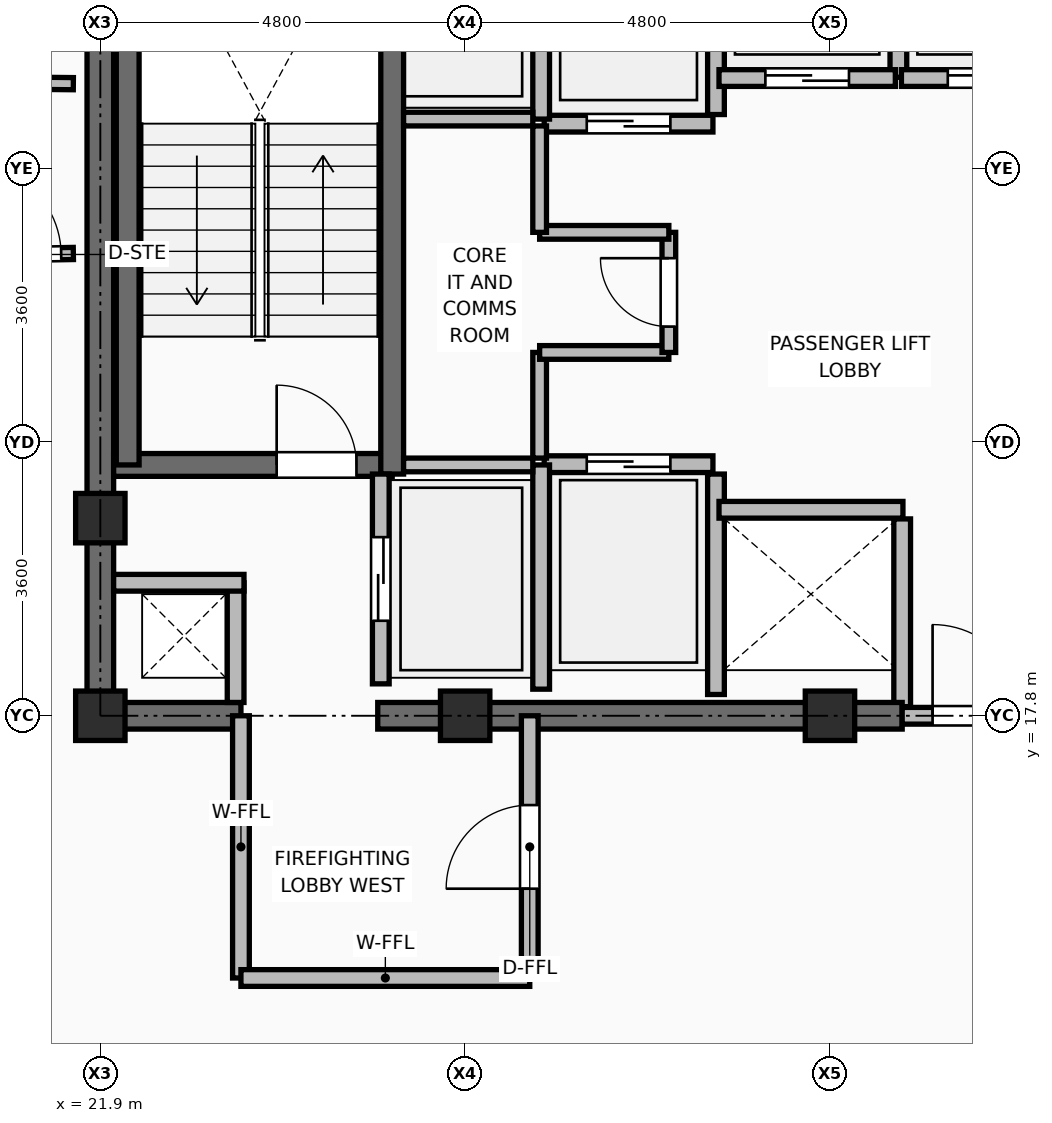
"""IFC4 building model, lengths in metres.
Left out: names, types, materials, properties, quantities, classifications, styles, units other than length and angle.
Written with IfcOpenShell. Run it as: python <this file> out.ifc"""

import sys

from ifc_helpers import new_model, si_unit, direction, frame, frame_2d, origin, origin_2d, place, context, subcontext, project, spatial, rectangle, extrude, element, fill, save


model = new_model("IFC4")
c1 = context("Model", 3, precision=1e-05, world=origin(), true_north=direction((0.0, 1.0)))
c2 = subcontext(c1, "Body", "Model", "MODEL_VIEW")
j1 = project(units=[si_unit("LENGTHUNIT", "METRE"), si_unit("PLANEANGLEUNIT", "RADIAN")], contexts=[c1])
p1 = place(None, origin())
s1 = spatial("IfcSite", under=j1, at=p1, CompositionType="ELEMENT")
p2 = place(p1, origin())
s2 = spatial("IfcBuilding", under=s1, at=p2, CompositionType="ELEMENT")
p3 = place(p2, frame((0.0, 0.0, 271.35)))
s3 = spatial("IfcBuildingStorey", under=s2, at=p3, CompositionType="ELEMENT", Elevation=271.35)
for number, where, z_axis, x_axis in (
    (1, (21.9, 17.8, 0.0), (0.0, 0.0, 1.0), (1.0, 0.0, 0.0)),
    (2, (26.7, 17.8, 0.0), (0.0, 0.0, 1.0), (1.0, 0.0, 0.0)),
    (3, (31.5, 17.8, 0.0), (0.0, 0.0, 1.0), (1.0, 0.0, 0.0)),
    (4, (21.9, 20.4, 0.0), (0.0, 0.0, 1.0), (1.0, 0.0, 0.0)),
):
    element("IfcColumn", number, at=place(p3, frame(where, z_axis=z_axis, x_axis=x_axis)), inside=s3, PredefinedType="COLUMN", context=c2, shape_type="SweptSolid", body=[
        extrude(rectangle(XDim=0.65, YDim=0.65, at=origin_2d()), origin(), (0.0, 0.0, 1.0), 3.75),
    ])
p4 = place(p3, frame((30.0, 18.08, 0.0), z_axis=(0.0, 0.0, 1.0), x_axis=(0.0, 1.0, 0.0)))
e5 = element("IfcWall", 5, at=p4, inside=s3, PredefinedType="PARTITIONING", context=c2, shape_type="SweptSolid", body=[
    extrude(rectangle(XDim=2.9, YDim=0.22, at=frame_2d((1.45, 0.0))), origin(), (0.0, 0.0, 1.0), 3.545),
])
p5 = place(p3, frame((32.45, 17.92, 0.0), z_axis=(0.0, 0.0, 1.0), x_axis=(0.0, 1.0, 0.0)))
e6 = element("IfcWall", 6, at=p5, inside=s3, PredefinedType="PARTITIONING", context=c2, shape_type="SweptSolid", body=[
    extrude(rectangle(XDim=2.47, YDim=0.22, at=frame_2d((1.235, 0.0))), origin(), (0.0, 0.0, 1.0), 3.545),
])
p6 = place(p3, frame((30.0, 25.71, 0.0), z_axis=(0.0, 0.0, 1.0), x_axis=(0.0, 1.0, 0.0)))
e7 = element("IfcWall", 7, at=p6, inside=s3, PredefinedType="PARTITIONING", context=c2, shape_type="SweptSolid", body=[
    extrude(rectangle(XDim=2.73, YDim=0.22, at=frame_2d((1.365, 0.0))), origin(), (0.0, 0.0, 1.0), 3.545),
])
p7 = place(p3, frame((32.4, 26.2, 0.0), z_axis=(0.0, 0.0, 1.0), x_axis=(0.0, 1.0, 0.0)))
e8 = element("IfcWall", 8, at=p7, inside=s3, PredefinedType="PARTITIONING", context=c2, shape_type="SweptSolid", body=[
    extrude(rectangle(XDim=2.24, YDim=0.22, at=frame_2d((1.12, 0.0))), origin(), (0.0, 0.0, 1.0), 3.545),
])
p8 = place(p3, frame((21.725, 17.8, 0.0), z_axis=(0.0, 0.0, 1.0), x_axis=(1.0, 0.0, 0.0)))
e9 = element("IfcWall", 9, at=p8, inside=s3, PredefinedType="SHEAR", context=c2, shape_type="SweptSolid", body=[
    extrude(rectangle(XDim=2.025, YDim=0.35, at=frame_2d((1.012, 0.0))), origin(), (0.0, 0.0, 1.0), 3.57),
])
p9 = place(p3, frame((25.55, 17.8, 0.0), z_axis=(0.0, 0.0, 1.0), x_axis=(1.0, 0.0, 0.0)))
e10 = element("IfcWall", 10, at=p9, inside=s3, PredefinedType="SHEAR", context=c2, shape_type="SweptSolid", body=[
    extrude(rectangle(XDim=6.9, YDim=0.35, at=frame_2d((3.45, 0.0))), origin(), (0.0, 0.0, 1.0), 3.57),
])
p10 = place(p3, frame((32.45, 17.8, 0.0), z_axis=(0.0, 0.0, 1.0), x_axis=(1.0, 0.0, 0.0)))
e11 = element("IfcWall", 11, at=p10, inside=s3, PredefinedType="PARTITIONING", context=c2, shape_type="SweptSolid", body=[
    extrude(rectangle(XDim=2.5, YDim=0.22, at=frame_2d((1.25, 0.0))), origin(), (0.0, 0.0, 1.0), 3.132),
])
p11 = place(p10, frame((0.4, 0.0, 0.0)))
e12 = element("IfcOpeningElement", 12, at=p11, cuts=e11, PredefinedType="OPENING", context=c2, shape_type="SweptSolid", body=[
    extrude(rectangle(XDim=1.2, YDim=2.1, at=frame_2d((0.6, 1.05))), frame((0.0, 0.12, 0.0), z_axis=(0.0, -1.0, 0.0), x_axis=(1.0, 0.0, 0.0)), (0.0, 0.0, 1.0), 0.24),
])
p12 = place(p3, frame((21.9, 17.975, 0.0), z_axis=(0.0, 0.0, 1.0), x_axis=(0.0, 1.0, 0.0)))
e13 = element("IfcWall", 13, at=p12, inside=s3, PredefinedType="SHEAR", context=c2, shape_type="SweptSolid", body=[
    extrude(rectangle(XDim=14.3, YDim=0.35, at=frame_2d((7.15, 0.0))), origin(), (0.0, 0.0, 1.0), 3.57),
])
p13 = place(p3, frame((22.075, 21.1, 0.0), z_axis=(0.0, 0.0, 1.0), x_axis=(1.0, 0.0, 0.0)))
e14 = element("IfcWall", 14, at=p13, inside=s3, PredefinedType="SHEAR", context=c2, shape_type="SweptSolid", body=[
    extrude(rectangle(XDim=3.665, YDim=0.3, at=frame_2d((1.833, 0.0))), origin(), (0.0, 0.0, 1.0), 3.57),
])
p14 = place(p13, frame((2.145, 0.0, 0.0)))
e15 = element("IfcOpeningElement", 15, at=p14, cuts=e14, PredefinedType="OPENING", context=c2, shape_type="SweptSolid", body=[
    extrude(rectangle(XDim=1.05, YDim=2.1, at=frame_2d((0.525, 1.05))), frame((0.0, 0.16, 0.0), z_axis=(0.0, -1.0, 0.0), x_axis=(1.0, 0.0, 0.0)), (0.0, 0.0, 1.0), 0.32),
])
p15 = place(p3, frame((25.74, 20.98, 0.0), z_axis=(0.0, 0.0, 1.0), x_axis=(0.0, 1.0, 0.0)))
e16 = element("IfcWall", 16, at=p15, inside=s3, PredefinedType="SHEAR", context=c2, shape_type="SweptSolid", body=[
    extrude(rectangle(XDim=7.99, YDim=0.3, at=frame_2d((3.995, 0.0))), origin(), (0.0, 0.0, 1.0), 3.57),
])
p16 = place(p3, frame((22.26, 21.1, 0.0), z_axis=(0.0, 0.0, 1.0), x_axis=(0.0, 1.0, 0.0)))
e17 = element("IfcWall", 17, at=p16, inside=s3, PredefinedType="SHEAR", context=c2, shape_type="SweptSolid", body=[
    extrude(rectangle(XDim=7.75, YDim=0.3, at=frame_2d((3.875, 0.0))), origin(), (0.0, 0.0, 1.0), 3.57),
])
p17 = place(p3, frame((23.68, 17.975, 0.0), z_axis=(0.0, 0.0, 1.0), x_axis=(0.0, 1.0, 0.0)))
e18 = element("IfcWall", 18, at=p17, inside=s3, PredefinedType="PARTITIONING", context=c2, shape_type="SweptSolid", body=[
    extrude(rectangle(XDim=1.575, YDim=0.22, at=frame_2d((0.788, 0.0))), origin(), (0.0, 0.0, 1.0), 3.132),
])
p18 = place(p3, frame((22.075, 19.55, 0.0), z_axis=(0.0, 0.0, 1.0), x_axis=(1.0, 0.0, 0.0)))
e19 = element("IfcWall", 19, at=p18, inside=s3, PredefinedType="PARTITIONING", context=c2, shape_type="SweptSolid", body=[
    extrude(rectangle(XDim=1.715, YDim=0.22, at=frame_2d((0.857, 0.0))), origin(), (0.0, 0.0, 1.0), 2.595),
])
p19 = place(p3, frame((25.59, 18.22, 0.0), z_axis=(0.0, 0.0, 1.0), x_axis=(0.0, 1.0, 0.0)))
e20 = element("IfcWall", 20, at=p19, inside=s3, PredefinedType="PARTITIONING", context=c2, shape_type="SweptSolid", body=[
    extrude(rectangle(XDim=2.76, YDim=0.22, at=frame_2d((1.38, 0.0))), origin(), (0.0, 0.0, 1.0), 3.55),
])
p20 = place(p19, frame((0.83, 0.0, 0.0)))
e21 = element("IfcOpeningElement", 21, at=p20, cuts=e20, PredefinedType="OPENING", context=c2, shape_type="SweptSolid", body=[
    extrude(rectangle(XDim=1.1, YDim=2.2, at=frame_2d((0.55, 1.1))), frame((0.0, 0.12, 0.0), z_axis=(0.0, -1.0, 0.0), x_axis=(1.0, 0.0, 0.0)), (0.0, 0.0, 1.0), 0.24),
])
p21 = place(p3, frame((27.74, 21.11, 0.0), z_axis=(0.0, 0.0, 1.0), x_axis=(1.0, 0.0, 0.0)))
e22 = element("IfcWall", 22, at=p21, inside=s3, PredefinedType="PARTITIONING", context=c2, shape_type="SweptSolid", body=[
    extrude(rectangle(XDim=2.22, YDim=0.22, at=frame_2d((1.11, 0.0))), origin(), (0.0, 0.0, 1.0), 3.55),
])
p22 = place(p21, frame((0.56, 0.0, 0.0)))
e23 = element("IfcOpeningElement", 23, at=p22, cuts=e22, PredefinedType="OPENING", context=c2, shape_type="SweptSolid", body=[
    extrude(rectangle(XDim=1.1, YDim=2.2, at=frame_2d((0.55, 1.1))), frame((0.0, 0.12, 0.0), z_axis=(0.0, -1.0, 0.0), x_axis=(1.0, 0.0, 0.0)), (0.0, 0.0, 1.0), 0.24),
])
p23 = place(p3, frame((27.74, 25.59, 0.0), z_axis=(0.0, 0.0, 1.0), x_axis=(1.0, 0.0, 0.0)))
e24 = element("IfcWall", 24, at=p23, inside=s3, PredefinedType="PARTITIONING", context=c2, shape_type="SweptSolid", body=[
    extrude(rectangle(XDim=2.22, YDim=0.22, at=frame_2d((1.11, 0.0))), origin(), (0.0, 0.0, 1.0), 3.55),
])
p24 = place(p23, frame((0.56, 0.0, 0.0)))
e25 = element("IfcOpeningElement", 25, at=p24, cuts=e24, PredefinedType="OPENING", context=c2, shape_type="SweptSolid", body=[
    extrude(rectangle(XDim=1.1, YDim=2.2, at=frame_2d((0.55, 1.1))), frame((0.0, 0.12, 0.0), z_axis=(0.0, -1.0, 0.0), x_axis=(1.0, 0.0, 0.0)), (0.0, 0.0, 1.0), 0.24),
])
p25 = place(p3, frame((30.04, 20.51, 0.0), z_axis=(0.0, 0.0, 1.0), x_axis=(1.0, 0.0, 0.0)))
e26 = element("IfcWall", 26, at=p25, inside=s3, PredefinedType="PARTITIONING", context=c2, shape_type="SweptSolid", body=[
    extrude(rectangle(XDim=2.42, YDim=0.22, at=frame_2d((1.21, 0.0))), origin(), (0.0, 0.0, 1.0), 3.55),
])
p26 = place(p3, frame((30.04, 26.19, 0.0), z_axis=(0.0, 0.0, 1.0), x_axis=(1.0, 0.0, 0.0)))
e27 = element("IfcWall", 27, at=p26, inside=s3, PredefinedType="PARTITIONING", context=c2, shape_type="SweptSolid", body=[
    extrude(rectangle(XDim=2.32, YDim=0.22, at=frame_2d((1.16, 0.0))), origin(), (0.0, 0.0, 1.0), 3.55),
])
p27 = place(p26, frame((0.61, 0.0, 0.0)))
e28 = element("IfcOpeningElement", 28, at=p27, cuts=e27, PredefinedType="OPENING", context=c2, shape_type="SweptSolid", body=[
    extrude(rectangle(XDim=1.1, YDim=2.2, at=frame_2d((0.55, 1.1))), frame((0.0, 0.12, 0.0), z_axis=(0.0, -1.0, 0.0), x_axis=(1.0, 0.0, 0.0)), (0.0, 0.0, 1.0), 0.24),
])
p28 = place(p3, frame((32.44, 26.19, 0.0), z_axis=(0.0, 0.0, 1.0), x_axis=(1.0, 0.0, 0.0)))
e29 = element("IfcWall", 29, at=p28, inside=s3, PredefinedType="PARTITIONING", context=c2, shape_type="SweptSolid", body=[
    extrude(rectangle(XDim=2.32, YDim=0.22, at=frame_2d((1.16, 0.0))), origin(), (0.0, 0.0, 1.0), 3.55),
])
p29 = place(p28, frame((0.61, 0.0, 0.0)))
e30 = element("IfcOpeningElement", 30, at=p29, cuts=e29, PredefinedType="OPENING", context=c2, shape_type="SweptSolid", body=[
    extrude(rectangle(XDim=1.1, YDim=2.2, at=frame_2d((0.55, 1.1))), frame((0.0, 0.12, 0.0), z_axis=(0.0, -1.0, 0.0), x_axis=(1.0, 0.0, 0.0)), (0.0, 0.0, 1.0), 0.24),
])
p30 = place(p3, frame((27.7, 18.15, 0.0), z_axis=(0.0, 0.0, 1.0), x_axis=(0.0, 1.0, 0.0)))
e31 = element("IfcWall", 31, at=p30, inside=s3, PredefinedType="PARTITIONING", context=c2, shape_type="SweptSolid", body=[
    extrude(rectangle(XDim=2.95, YDim=0.22, at=frame_2d((1.475, 0.0))), origin(), (0.0, 0.0, 1.0), 3.55),
])
p31 = place(p3, frame((27.7, 25.65, 0.0), z_axis=(0.0, 0.0, 1.0), x_axis=(0.0, 1.0, 0.0)))
e32 = element("IfcWall", 32, at=p31, inside=s3, PredefinedType="PARTITIONING", context=c2, shape_type="SweptSolid", body=[
    extrude(rectangle(XDim=3.0, YDim=0.22, at=frame_2d((1.5, 0.0))), origin(), (0.0, 0.0, 1.0), 3.55),
])
for number, where, z_axis, x_axis in (
    (33, (25.89, 21.1, 0.0), (0.0, 0.0, 1.0), (1.0, 0.0, 0.0)),
    (34, (25.89, 25.65, 0.0), (0.0, 0.0, 1.0), (1.0, 0.0, 0.0)),
):
    element("IfcWall", number, at=place(p3, frame(where, z_axis=z_axis, x_axis=x_axis)), inside=s3, PredefinedType="PARTITIONING", context=c2, shape_type="SweptSolid", body=[
        extrude(rectangle(XDim=1.7, YDim=0.18, at=frame_2d((0.85, 0.0))), origin(), (0.0, 0.0, 1.0), 3.55),
    ])
p32 = place(p3, frame((27.68, 21.19, 0.0), z_axis=(0.0, 0.0, 1.0), x_axis=(0.0, 1.0, 0.0)))
e35 = element("IfcWall", 35, at=p32, inside=s3, PredefinedType="PARTITIONING", context=c2, shape_type="SweptSolid", body=[
    extrude(rectangle(XDim=1.39, YDim=0.18, at=frame_2d((0.695, 0.0))), origin(), (0.0, 0.0, 1.0), 3.55),
])
p33 = place(p3, frame((27.68, 22.58, 0.0), z_axis=(0.0, 0.0, 1.0), x_axis=(1.0, 0.0, 0.0)))
e36 = element("IfcWall", 36, at=p33, inside=s3, PredefinedType="PARTITIONING", context=c2, shape_type="SweptSolid", body=[
    extrude(rectangle(XDim=1.7, YDim=0.18, at=frame_2d((0.85, 0.0))), origin(), (0.0, 0.0, 1.0), 3.55),
])
p34 = place(p3, frame((29.38, 22.58, 0.0), z_axis=(0.0, 0.0, 1.0), x_axis=(0.0, 1.0, 0.0)))
e37 = element("IfcWall", 37, at=p34, inside=s3, PredefinedType="PARTITIONING", context=c2, shape_type="SweptSolid", body=[
    extrude(rectangle(XDim=1.58, YDim=0.18, at=frame_2d((0.79, 0.0))), origin(), (0.0, 0.0, 1.0), 3.55),
])
p35 = place(p34, frame((0.34, 0.0, 0.0)))
e38 = element("IfcOpeningElement", 38, at=p35, cuts=e37, PredefinedType="OPENING", context=c2, shape_type="SweptSolid", body=[
    extrude(rectangle(XDim=0.9, YDim=2.1, at=frame_2d((0.45, 1.05))), frame((0.0, 0.1, 0.0), z_axis=(0.0, -1.0, 0.0), x_axis=(1.0, 0.0, 0.0)), (0.0, 0.0, 1.0), 0.2),
])
p36 = place(p3, frame((27.68, 24.16, 0.0), z_axis=(0.0, 0.0, 1.0), x_axis=(1.0, 0.0, 0.0)))
e39 = element("IfcWall", 39, at=p36, inside=s3, PredefinedType="PARTITIONING", context=c2, shape_type="SweptSolid", body=[
    extrude(rectangle(XDim=1.7, YDim=0.18, at=frame_2d((0.85, 0.0))), origin(), (0.0, 0.0, 1.0), 3.55),
])
p37 = place(p3, frame((27.68, 24.16, 0.0), z_axis=(0.0, 0.0, 1.0), x_axis=(0.0, 1.0, 0.0)))
e40 = element("IfcWall", 40, at=p37, inside=s3, PredefinedType="PARTITIONING", context=c2, shape_type="SweptSolid", body=[
    extrude(rectangle(XDim=1.4, YDim=0.18, at=frame_2d((0.7, 0.0))), origin(), (0.0, 0.0, 1.0), 3.55),
])
p38 = place(p3, frame((23.75, 14.35, 0.0), z_axis=(0.0, 0.0, 1.0), x_axis=(0.0, 1.0, 0.0)))
e41 = element("IfcWall", 41, at=p38, inside=s3, PredefinedType="PARTITIONING", context=c2, shape_type="SweptSolid", body=[
    extrude(rectangle(XDim=3.45, YDim=0.22, at=frame_2d((1.725, 0.0))), origin(), (0.0, 0.0, 1.0), 3.132),
])
p39 = place(p3, frame((23.75, 14.35, 0.0), z_axis=(0.0, 0.0, 1.0), x_axis=(1.0, 0.0, 0.0)))
e42 = element("IfcWall", 42, at=p39, inside=s3, PredefinedType="PARTITIONING", context=c2, shape_type="SweptSolid", body=[
    extrude(rectangle(XDim=3.8, YDim=0.22, at=frame_2d((1.9, 0.0))), origin(), (0.0, 0.0, 1.0), 3.55),
])
p40 = place(p3, frame((27.55, 14.35, 0.0), z_axis=(0.0, 0.0, 1.0), x_axis=(0.0, 1.0, 0.0)))
e43 = element("IfcWall", 43, at=p40, inside=s3, PredefinedType="PARTITIONING", context=c2, shape_type="SweptSolid", body=[
    extrude(rectangle(XDim=3.45, YDim=0.22, at=frame_2d((1.725, 0.0))), origin(), (0.0, 0.0, 1.0), 3.132),
])
p41 = place(p40, frame((1.175, 0.0, 0.0)))
e44 = element("IfcOpeningElement", 44, at=p41, cuts=e43, PredefinedType="OPENING", context=c2, shape_type="SweptSolid", body=[
    extrude(rectangle(XDim=1.1, YDim=2.1, at=frame_2d((0.55, 1.05))), frame((0.0, 0.12, 0.0), z_axis=(0.0, -1.0, 0.0), x_axis=(1.0, 0.0, 0.0)), (0.0, 0.0, 1.0), 0.24),
])
p42 = place(p3, frame((21.545, 26.116, 0.0), z_axis=(0.0, 0.0, 1.0), x_axis=(-0.999947421001, 0.010254522592, 0.0)))
e45 = element("IfcWall", 45, at=p42, inside=s3, PredefinedType="PARTITIONING", context=c2, shape_type="SweptSolid", body=[
    extrude(rectangle(XDim=1.857, YDim=0.16, at=frame_2d((0.928, 0.0))), origin(), (0.0, 0.0, 1.0), 2.595),
])
p43 = place(p3, frame((19.685, 23.85, 0.0), z_axis=(0.0, 0.0, 1.0), x_axis=(0.999852179606, 0.017193572529, 0.0)))
e46 = element("IfcWall", 46, at=p43, inside=s3, PredefinedType="PARTITIONING", context=c2, shape_type="SweptSolid", body=[
    extrude(rectangle(XDim=1.86, YDim=0.16, at=frame_2d((0.93, 0.0))), origin(), (0.0, 0.0, 1.0), 2.595),
])
p44 = place(p43, frame((0.5, 0.0, 0.0)))
e47 = element("IfcOpeningElement", 47, at=p44, cuts=e46, PredefinedType="OPENING", context=c2, shape_type="SweptSolid", body=[
    extrude(rectangle(XDim=1.2, YDim=2.1, at=frame_2d((0.6, 1.05))), frame((0.0, 0.09, 0.0), z_axis=(0.0, -1.0, 0.0), x_axis=(1.0, 0.0, 0.0)), (0.0, 0.0, 1.0), 0.18),
])
p45 = place(p11, origin())
e48 = element("IfcDoor", 48, at=p45, inside=s3, OperationType="SINGLE_SWING_LEFT", PredefinedType="DOOR", context=c2, shape_type="SweptSolid", body=[
    extrude(rectangle(XDim=1.2, YDim=2.1, at=frame_2d((0.6, 1.05))), frame((0.0, 0.025, 0.0), z_axis=(0.0, -1.0, 0.0), x_axis=(1.0, 0.0, 0.0)), (0.0, 0.0, 1.0), 0.05),
])
fill(e12, e48)
p46 = place(p14, origin())
e49 = element("IfcDoor", 49, at=p46, inside=s3, OperationType="SINGLE_SWING_LEFT", PredefinedType="DOOR", context=c2, shape_type="SweptSolid", body=[
    extrude(rectangle(XDim=1.05, YDim=2.1, at=frame_2d((0.525, 1.05))), frame((0.0, 0.025, 0.0), z_axis=(0.0, -1.0, 0.0), x_axis=(1.0, 0.0, 0.0)), (0.0, 0.0, 1.0), 0.05),
])
fill(e15, e49)
p47 = place(p20, origin())
e50 = element("IfcDoor", 50, at=p47, inside=s3, OperationType="DOUBLE_DOOR_SLIDING", PredefinedType="DOOR", context=c2, shape_type="SweptSolid", body=[
    extrude(rectangle(XDim=1.1, YDim=2.2, at=frame_2d((0.55, 1.1))), frame((0.0, 0.025, 0.0), z_axis=(0.0, -1.0, 0.0), x_axis=(1.0, 0.0, 0.0)), (0.0, 0.0, 1.0), 0.05),
])
fill(e21, e50)
p48 = place(p22, origin())
e51 = element("IfcDoor", 51, at=p48, inside=s3, OperationType="DOUBLE_DOOR_SLIDING", PredefinedType="DOOR", context=c2, shape_type="SweptSolid", body=[
    extrude(rectangle(XDim=1.1, YDim=2.2, at=frame_2d((0.55, 1.1))), frame((0.0, 0.025, 0.0), z_axis=(0.0, -1.0, 0.0), x_axis=(1.0, 0.0, 0.0)), (0.0, 0.0, 1.0), 0.05),
])
fill(e23, e51)
p49 = place(p24, frame((1.1, 0.0, 0.0), z_axis=(0.0, 0.0, 1.0), x_axis=(-1.0, 0.0, 0.0)))
e52 = element("IfcDoor", 52, at=p49, inside=s3, OperationType="DOUBLE_DOOR_SLIDING", PredefinedType="DOOR", context=c2, shape_type="SweptSolid", body=[
    extrude(rectangle(XDim=1.1, YDim=2.2, at=frame_2d((0.55, 1.1))), frame((0.0, 0.025, 0.0), z_axis=(0.0, -1.0, 0.0), x_axis=(1.0, 0.0, 0.0)), (0.0, 0.0, 1.0), 0.05),
])
fill(e25, e52)
p50 = place(p27, frame((1.1, 0.0, 0.0), z_axis=(0.0, 0.0, 1.0), x_axis=(-1.0, 0.0, 0.0)))
e53 = element("IfcDoor", 53, at=p50, inside=s3, OperationType="DOUBLE_DOOR_SLIDING", PredefinedType="DOOR", context=c2, shape_type="SweptSolid", body=[
    extrude(rectangle(XDim=1.1, YDim=2.2, at=frame_2d((0.55, 1.1))), frame((0.0, 0.025, 0.0), z_axis=(0.0, -1.0, 0.0), x_axis=(1.0, 0.0, 0.0)), (0.0, 0.0, 1.0), 0.05),
])
fill(e28, e53)
p51 = place(p29, frame((1.1, 0.0, 0.0), z_axis=(0.0, 0.0, 1.0), x_axis=(-1.0, 0.0, 0.0)))
e54 = element("IfcDoor", 54, at=p51, inside=s3, OperationType="DOUBLE_DOOR_SLIDING", PredefinedType="DOOR", context=c2, shape_type="SweptSolid", body=[
    extrude(rectangle(XDim=1.1, YDim=2.2, at=frame_2d((0.55, 1.1))), frame((0.0, 0.025, 0.0), z_axis=(0.0, -1.0, 0.0), x_axis=(1.0, 0.0, 0.0)), (0.0, 0.0, 1.0), 0.05),
])
fill(e30, e54)
p52 = place(p35, origin())
e55 = element("IfcDoor", 55, at=p52, inside=s3, OperationType="SINGLE_SWING_RIGHT", PredefinedType="DOOR", context=c2, shape_type="SweptSolid", body=[
    extrude(rectangle(XDim=0.9, YDim=2.1, at=frame_2d((0.45, 1.05))), frame((0.0, 0.025, 0.0), z_axis=(0.0, -1.0, 0.0), x_axis=(1.0, 0.0, 0.0)), (0.0, 0.0, 1.0), 0.05),
])
fill(e38, e55)
p53 = place(p41, origin())
e56 = element("IfcDoor", 56, at=p53, inside=s3, OperationType="SINGLE_SWING_LEFT", PredefinedType="DOOR", context=c2, shape_type="SweptSolid", body=[
    extrude(rectangle(XDim=1.1, YDim=2.1, at=frame_2d((0.55, 1.05))), frame((0.0, 0.025, 0.0), z_axis=(0.0, -1.0, 0.0), x_axis=(1.0, 0.0, 0.0)), (0.0, 0.0, 1.0), 0.05),
])
fill(e44, e56)
p54 = place(p44, origin())
e57 = element("IfcDoor", 57, at=p54, inside=s3, OperationType="SINGLE_SWING_LEFT", PredefinedType="DOOR", context=c2, shape_type="SweptSolid", body=[
    extrude(rectangle(XDim=1.2, YDim=2.1, at=frame_2d((0.6, 1.05))), frame((0.0, 0.025, 0.0), z_axis=(0.0, -1.0, 0.0), x_axis=(1.0, 0.0, 0.0)), (0.0, 0.0, 1.0), 0.05),
])
fill(e47, e57)
save(model, sys.argv[1])
